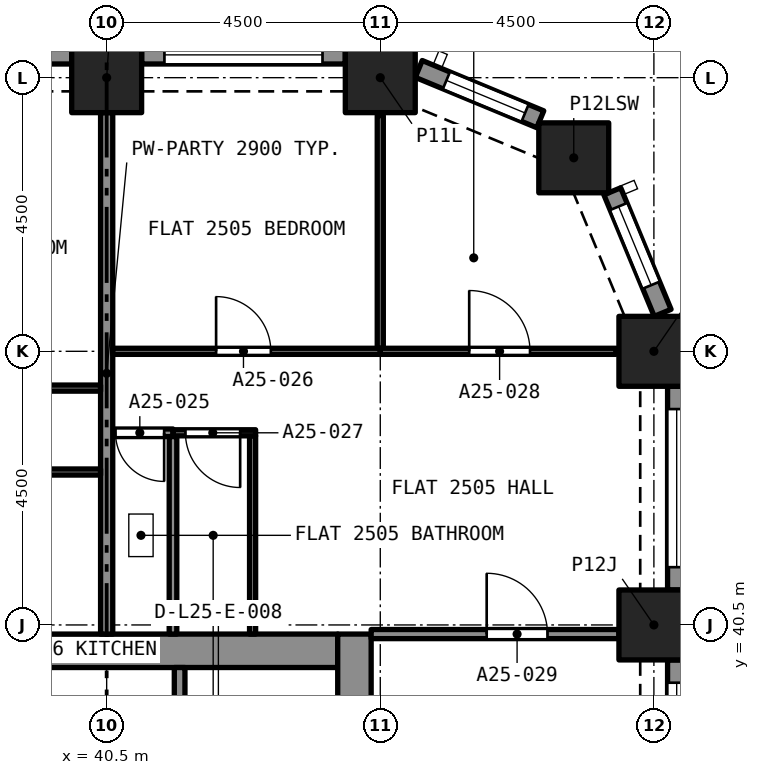
"""IFC4 building model, lengths in metres.
Left out: names, types, materials, properties, quantities, classifications, styles, units other than length and angle.
Written with IfcOpenShell. Run it as: python <this file> out.ifc"""

import sys

from ifc_helpers import new_model, si_unit, direction, frame, frame_2d, origin, origin_2d, place, context, subcontext, project, spatial, rectangle, extrude, element, fill, save


model = new_model("IFC4")
c1 = context("Model", 3, precision=1e-05, world=origin(), true_north=direction((0.0, 1.0)))
c2 = subcontext(c1, "Body", "Model", "MODEL_VIEW")
j1 = project(units=[si_unit("LENGTHUNIT", "METRE"), si_unit("PLANEANGLEUNIT", "RADIAN")], contexts=[c1])
p1 = place(None, origin())
s1 = spatial("IfcSite", under=j1, at=p1, CompositionType="ELEMENT")
p2 = place(p1, origin())
s2 = spatial("IfcBuilding", under=s1, at=p2, CompositionType="ELEMENT")
p3 = place(p2, frame((0.0, 0.0, 92.8)))
s3 = spatial("IfcBuildingStorey", under=s2, at=p3, CompositionType="ELEMENT", Elevation=92.8)
for number, where, z_axis, x_axis in (
    (1, (49.5, 40.5, 0.0), (0.0, 0.0, 1.0), (1.0, 0.0, 0.0)),
    (2, (49.5, 45.0, 0.0), (0.0, 0.0, 1.0), (1.0, 0.0, 0.0)),
    (3, (48.182, 48.182, 0.0), (0.0, 0.0, 1.0), (1.0, 0.0, 0.0)),
    (4, (40.5, 49.5, 0.0), (0.0, 0.0, 1.0), (1.0, 0.0, 0.0)),
    (5, (45.0, 49.5, 0.0), (0.0, 0.0, 1.0), (1.0, 0.0, 0.0)),
):
    element("IfcColumn", number, at=place(p3, frame(where, z_axis=z_axis, x_axis=x_axis)), inside=s3, PredefinedType="COLUMN", context=c2, shape_type="SweptSolid", body=[
        extrude(rectangle(XDim=1.15, YDim=1.15, at=origin_2d()), origin(), (0.0, 0.0, 1.0), 3.2),
    ])
p4 = place(p3, frame((36.7, 40.075, 0.0), z_axis=(0.0, 0.0, 1.0), x_axis=(1.0, 0.0, 0.0)))
e6 = element("IfcWall", 6, at=p4, inside=s3, PredefinedType="SOLIDWALL", context=c2, shape_type="SweptSolid", body=[
    extrude(rectangle(XDim=7.6, YDim=0.55, at=frame_2d((3.8, 0.0))), origin(), (0.0, 0.0, 1.0), 3.2),
])
p5 = place(p3, frame((44.575, 27.15, 0.0), z_axis=(0.0, 0.0, 1.0), x_axis=(0.0, 1.0, 0.0)))
e7 = element("IfcWall", 7, at=p5, inside=s3, PredefinedType="SOLIDWALL", context=c2, shape_type="SweptSolid", body=[
    extrude(rectangle(XDim=13.2, YDim=0.55, at=frame_2d((6.6, 0.0))), origin(), (0.0, 0.0, 1.0), 3.2),
])
p6 = place(p5, frame((8.8, 0.0, 0.0)))
e8 = element("IfcOpeningElement", 8, at=p6, cuts=e7, PredefinedType="OPENING", context=c2, shape_type="SweptSolid", body=[
    extrude(rectangle(XDim=1.2, YDim=2.1, at=frame_2d((0.6, 1.05))), frame((0.0, 0.285, 0.0), z_axis=(0.0, -1.0, 0.0), x_axis=(1.0, 0.0, 0.0)), (0.0, 0.0, 1.0), 0.57),
])
p7 = place(p3, frame((49.875, 39.925, 0.0), z_axis=(0.0, 0.0, 1.0), x_axis=(0.0, -1.0, 0.0)))
e9 = element("IfcWall", 9, at=p7, inside=s3, PredefinedType="SOLIDWALL", context=c2, shape_type="SweptSolid", body=[
    extrude(rectangle(XDim=3.35, YDim=0.3, at=frame_2d((1.675, 0.0))), origin(), (0.0, 0.0, 1.0), 3.2),
])
p8 = place(p7, frame((0.375, 0.0, 0.45)))
e10 = element("IfcOpeningElement", 10, at=p8, cuts=e9, PredefinedType="OPENING", context=c2, shape_type="SweptSolid", body=[
    extrude(rectangle(XDim=2.6, YDim=1.95, at=frame_2d((1.3, 0.975))), frame((0.0, 0.16, 0.0), z_axis=(0.0, -1.0, 0.0), x_axis=(1.0, 0.0, 0.0)), (0.0, 0.0, 1.0), 0.32),
])
p9 = place(p3, frame((49.875, 44.425, 0.0), z_axis=(0.0, 0.0, 1.0), x_axis=(0.0, -1.0, 0.0)))
e11 = element("IfcWall", 11, at=p9, inside=s3, PredefinedType="SOLIDWALL", context=c2, shape_type="SweptSolid", body=[
    extrude(rectangle(XDim=3.35, YDim=0.3, at=frame_2d((1.675, 0.0))), origin(), (0.0, 0.0, 1.0), 3.2),
])
p10 = place(p9, frame((0.375, 0.0, 0.45)))
e12 = element("IfcOpeningElement", 12, at=p10, cuts=e11, PredefinedType="OPENING", context=c2, shape_type="SweptSolid", body=[
    extrude(rectangle(XDim=2.6, YDim=1.95, at=frame_2d((1.3, 0.975))), frame((0.0, 0.16, 0.0), z_axis=(0.0, -1.0, 0.0), x_axis=(1.0, 0.0, 0.0)), (0.0, 0.0, 1.0), 0.32),
])
p11 = place(p3, frame((48.816, 47.631, 0.0), z_axis=(0.0, 0.0, 1.0), x_axis=(0.382723818695, -0.923862802911, 0.0)))
e13 = element("IfcWall", 13, at=p11, inside=s3, PredefinedType="SOLIDWALL", context=c2, shape_type="SweptSolid", body=[
    extrude(rectangle(XDim=2.164, YDim=0.3, at=frame_2d((1.082, 0.0))), origin(), (0.0, 0.0, 1.0), 3.2),
])
p12 = place(p11, frame((0.271, 0.0, 0.45)))
e14 = element("IfcOpeningElement", 14, at=p12, cuts=e13, PredefinedType="OPENING", context=c2, shape_type="SweptSolid", body=[
    extrude(rectangle(XDim=1.4, YDim=1.95, at=frame_2d((0.7, 0.975))), frame((0.0, 0.16, 0.0), z_axis=(0.0, -1.0, 0.0), x_axis=(1.0, 0.0, 0.0)), (0.0, 0.0, 1.0), 0.32),
])
p13 = place(p3, frame((45.632, 49.644, 0.0), z_axis=(0.0, 0.0, 1.0), x_axis=(0.923862802911, -0.382723818695, 0.0)))
e15 = element("IfcWall", 15, at=p13, inside=s3, PredefinedType="SOLIDWALL", context=c2, shape_type="SweptSolid", body=[
    extrude(rectangle(XDim=2.164, YDim=0.3, at=frame_2d((1.082, 0.0))), origin(), (0.0, 0.0, 1.0), 3.2),
])
p14 = place(p13, frame((0.493, 0.0, 0.45)))
e16 = element("IfcOpeningElement", 16, at=p14, cuts=e15, PredefinedType="OPENING", context=c2, shape_type="SweptSolid", body=[
    extrude(rectangle(XDim=1.4, YDim=1.95, at=frame_2d((0.7, 0.975))), frame((0.0, 0.16, 0.0), z_axis=(0.0, -1.0, 0.0), x_axis=(1.0, 0.0, 0.0)), (0.0, 0.0, 1.0), 0.32),
])
p15 = place(p3, frame((41.075, 49.875, 0.0), z_axis=(0.0, 0.0, 1.0), x_axis=(1.0, 0.0, 0.0)))
e17 = element("IfcWall", 17, at=p15, inside=s3, PredefinedType="SOLIDWALL", context=c2, shape_type="SweptSolid", body=[
    extrude(rectangle(XDim=3.35, YDim=0.3, at=frame_2d((1.675, 0.0))), origin(), (0.0, 0.0, 1.0), 3.2),
])
p16 = place(p15, frame((0.375, 0.0, 0.45)))
e18 = element("IfcOpeningElement", 18, at=p16, cuts=e17, PredefinedType="OPENING", context=c2, shape_type="SweptSolid", body=[
    extrude(rectangle(XDim=2.6, YDim=1.95, at=frame_2d((1.3, 0.975))), frame((0.0, 0.16, 0.0), z_axis=(0.0, -1.0, 0.0), x_axis=(1.0, 0.0, 0.0)), (0.0, 0.0, 1.0), 0.32),
])
p17 = place(p3, frame((36.575, 49.875, 0.0), z_axis=(0.0, 0.0, 1.0), x_axis=(1.0, 0.0, 0.0)))
e19 = element("IfcWall", 19, at=p17, inside=s3, PredefinedType="SOLIDWALL", context=c2, shape_type="SweptSolid", body=[
    extrude(rectangle(XDim=3.35, YDim=0.3, at=frame_2d((1.675, 0.0))), origin(), (0.0, 0.0, 1.0), 3.2),
])
p18 = place(p17, frame((0.375, 0.0, 0.45)))
e20 = element("IfcOpeningElement", 20, at=p18, cuts=e19, PredefinedType="OPENING", context=c2, shape_type="SweptSolid", body=[
    extrude(rectangle(XDim=2.6, YDim=1.95, at=frame_2d((1.3, 0.975))), frame((0.0, 0.16, 0.0), z_axis=(0.0, -1.0, 0.0), x_axis=(1.0, 0.0, 0.0)), (0.0, 0.0, 1.0), 0.32),
])
p19 = place(p3, frame((41.591, 43.66, 0.0), z_axis=(0.0, 0.0, 1.0), x_axis=(-1.0, 0.0, 0.0)))
e21 = element("IfcWall", 21, at=p19, inside=s3, PredefinedType="PARTITIONING", context=c2, shape_type="SweptSolid", body=[
    extrude(rectangle(XDim=0.991, YDim=0.125, at=frame_2d((0.495, 0.0))), origin(), (0.0, 0.0, 1.0), 2.9),
])
p20 = place(p19, frame((0.146, 0.0, 0.0)))
e22 = element("IfcOpeningElement", 22, at=p20, cuts=e21, PredefinedType="OPENING", context=c2, shape_type="SweptSolid", body=[
    extrude(rectangle(XDim=0.8, YDim=2.1, at=frame_2d((0.4, 1.05))), frame((0.0, 0.073, 0.0), z_axis=(0.0, -1.0, 0.0), x_axis=(1.0, 0.0, 0.0)), (0.0, 0.0, 1.0), 0.145),
])
p21 = place(p3, frame((41.591, 40.35, 0.0), z_axis=(0.0, 0.0, 1.0), x_axis=(0.0, 1.0, 0.0)))
e23 = element("IfcWall", 23, at=p21, inside=s3, PredefinedType="PARTITIONING", context=c2, shape_type="SweptSolid", body=[
    extrude(rectangle(XDim=3.247, YDim=0.125, at=frame_2d((1.624, 0.0))), origin(), (0.0, 0.0, 1.0), 2.9),
])
p22 = place(p3, frame((40.5, 40.35, 0.0), z_axis=(0.0, 0.0, 1.0), x_axis=(0.0, 1.0, 0.0)))
e24 = element("IfcWall", 24, at=p22, inside=s3, PredefinedType="PARTITIONING", context=c2, shape_type="SweptSolid", body=[
    extrude(rectangle(XDim=8.575, YDim=0.2, at=frame_2d((4.288, 0.0))), origin(), (0.0, 0.0, 1.0), 2.9),
])
p23 = place(p3, frame((40.6, 45.0, 0.0), z_axis=(0.0, 0.0, 1.0), x_axis=(1.0, 0.0, 0.0)))
e25 = element("IfcWall", 25, at=p23, inside=s3, PredefinedType="PARTITIONING", context=c2, shape_type="SweptSolid", body=[
    extrude(rectangle(XDim=4.4, YDim=0.1, at=frame_2d((2.2, 0.0))), origin(), (0.0, 0.0, 1.0), 2.9),
])
p24 = place(p23, frame((1.7, 0.0, 0.0)))
e26 = element("IfcOpeningElement", 26, at=p24, cuts=e25, PredefinedType="OPENING", context=c2, shape_type="SweptSolid", body=[
    extrude(rectangle(XDim=0.9, YDim=2.1, at=frame_2d((0.45, 1.05))), frame((0.0, 0.06, 0.0), z_axis=(0.0, -1.0, 0.0), x_axis=(1.0, 0.0, 0.0)), (0.0, 0.0, 1.0), 0.12),
])
p25 = place(p3, frame((45.0, 45.05, 0.0), z_axis=(0.0, 0.0, 1.0), x_axis=(0.0, 1.0, 0.0)))
e27 = element("IfcWall", 27, at=p25, inside=s3, PredefinedType="PARTITIONING", context=c2, shape_type="SweptSolid", body=[
    extrude(rectangle(XDim=3.828, YDim=0.1, at=frame_2d((1.914, 0.0))), origin(), (0.0, 0.0, 1.0), 2.9),
])
p26 = place(p3, frame((42.9, 40.35, 0.0), z_axis=(0.0, 0.0, 1.0), x_axis=(0.0, 1.0, 0.0)))
e28 = element("IfcWall", 28, at=p26, inside=s3, PredefinedType="PARTITIONING", context=c2, shape_type="SweptSolid", body=[
    extrude(rectangle(XDim=3.26, YDim=0.1, at=frame_2d((1.63, 0.0))), origin(), (0.0, 0.0, 1.0), 2.9),
])
p27 = place(p3, frame((42.95, 43.66, 0.0), z_axis=(0.0, 0.0, 1.0), x_axis=(-1.0, 0.0, 0.0)))
e29 = element("IfcWall", 29, at=p27, inside=s3, PredefinedType="PARTITIONING", context=c2, shape_type="SweptSolid", body=[
    extrude(rectangle(XDim=1.359, YDim=0.1, at=frame_2d((0.68, 0.0))), origin(), (0.0, 0.0, 1.0), 2.9),
])
p28 = place(p27, frame((0.254, 0.0, 0.0)))
e30 = element("IfcOpeningElement", 30, at=p28, cuts=e29, PredefinedType="OPENING", context=c2, shape_type="SweptSolid", body=[
    extrude(rectangle(XDim=0.9, YDim=2.1, at=frame_2d((0.45, 1.05))), frame((0.0, 0.06, 0.0), z_axis=(0.0, -1.0, 0.0), x_axis=(1.0, 0.0, 0.0)), (0.0, 0.0, 1.0), 0.12),
])
p29 = place(p3, frame((45.0, 45.0, 0.0), z_axis=(0.0, 0.0, 1.0), x_axis=(1.0, 0.0, 0.0)))
e31 = element("IfcWall", 31, at=p29, inside=s3, PredefinedType="PARTITIONING", context=c2, shape_type="SweptSolid", body=[
    extrude(rectangle(XDim=3.878, YDim=0.1, at=frame_2d((1.939, 0.0))), origin(), (0.0, 0.0, 1.0), 2.9),
])
p30 = place(p29, frame((1.462, 0.0, 0.0)))
e32 = element("IfcOpeningElement", 32, at=p30, cuts=e31, PredefinedType="OPENING", context=c2, shape_type="SweptSolid", body=[
    extrude(rectangle(XDim=1.0, YDim=2.1, at=frame_2d((0.5, 1.05))), frame((0.0, 0.06, 0.0), z_axis=(0.0, -1.0, 0.0), x_axis=(1.0, 0.0, 0.0)), (0.0, 0.0, 1.0), 0.12),
])
p31 = place(p3, frame((44.85, 40.35, 0.0), z_axis=(0.0, 0.0, 1.0), x_axis=(1.0, 0.0, 0.0)))
e33 = element("IfcWall", 33, at=p31, inside=s3, PredefinedType="PARTITIONING", context=c2, shape_type="SweptSolid", body=[
    extrude(rectangle(XDim=4.075, YDim=0.15, at=frame_2d((2.038, 0.0))), origin(), (0.0, 0.0, 1.0), 2.9),
])
p32 = place(p31, frame((1.9, 0.0, 0.0)))
e34 = element("IfcOpeningElement", 34, at=p32, cuts=e33, PredefinedType="OPENING", context=c2, shape_type="SweptSolid", body=[
    extrude(rectangle(XDim=1.0, YDim=2.1, at=frame_2d((0.5, 1.05))), frame((0.0, 0.085, 0.0), z_axis=(0.0, -1.0, 0.0), x_axis=(1.0, 0.0, 0.0)), (0.0, 0.0, 1.0), 0.17),
])
p33 = place(p3, frame((36.0, 44.395, 0.0), z_axis=(0.0, 0.0, 1.0), x_axis=(1.0, 0.0, 0.0)))
e35 = element("IfcWall", 35, at=p33, inside=s3, PredefinedType="PARTITIONING", context=c2, shape_type="SweptSolid", body=[
    extrude(rectangle(XDim=4.4, YDim=0.1, at=frame_2d((2.2, 0.0))), origin(), (0.0, 0.0, 1.0), 2.9),
])
p34 = place(p33, frame((1.8, 0.0, 0.0)))
e36 = element("IfcOpeningElement", 36, at=p34, cuts=e35, PredefinedType="OPENING", context=c2, shape_type="SweptSolid", body=[
    extrude(rectangle(XDim=0.9, YDim=2.1, at=frame_2d((0.45, 1.05))), frame((0.0, 0.06, 0.0), z_axis=(0.0, -1.0, 0.0), x_axis=(1.0, 0.0, 0.0)), (0.0, 0.0, 1.0), 0.12),
])
p35 = place(p3, frame((40.4, 43.015, 0.0), z_axis=(0.0, 0.0, 1.0), x_axis=(-1.0, 0.0, 0.0)))
e37 = element("IfcWall", 37, at=p35, inside=s3, PredefinedType="PARTITIONING", context=c2, shape_type="SweptSolid", body=[
    extrude(rectangle(XDim=3.209, YDim=0.1, at=frame_2d((1.605, 0.0))), origin(), (0.0, 0.0, 1.0), 2.9),
])
p36 = place(p35, frame((1.105, 0.0, 0.0)))
e38 = element("IfcOpeningElement", 38, at=p36, cuts=e37, PredefinedType="OPENING", context=c2, shape_type="SweptSolid", body=[
    extrude(rectangle(XDim=0.9, YDim=2.1, at=frame_2d((0.45, 1.05))), frame((0.0, 0.06, 0.0), z_axis=(0.0, -1.0, 0.0), x_axis=(1.0, 0.0, 0.0)), (0.0, 0.0, 1.0), 0.12),
])
p37 = place(p3, frame((41.7, 37.5, 0.0), z_axis=(0.0, 0.0, 1.0), x_axis=(0.0, 1.0, 0.0)))
e39 = element("IfcWall", 39, at=p37, inside=s3, PredefinedType="SOLIDWALL", context=c2, shape_type="SweptSolid", body=[
    extrude(rectangle(XDim=2.3, YDim=0.175, at=frame_2d((1.15, 0.0))), origin(), (0.0, 0.0, 1.0), 2.9),
])
p38 = place(p8, origin())
e40 = element("IfcWindow", 40, at=p38, inside=s3, PartitioningType="SINGLE_PANEL", PredefinedType="WINDOW", context=c2, shape_type="SweptSolid", body=[
    extrude(rectangle(XDim=2.6, YDim=1.95, at=frame_2d((1.3, 0.975))), frame((0.0, 0.03, 0.0), z_axis=(0.0, -1.0, 0.0), x_axis=(1.0, 0.0, 0.0)), (0.0, 0.0, 1.0), 0.06),
])
fill(e10, e40)
p39 = place(p10, origin())
e41 = element("IfcWindow", 41, at=p39, inside=s3, PartitioningType="SINGLE_PANEL", PredefinedType="WINDOW", context=c2, shape_type="SweptSolid", body=[
    extrude(rectangle(XDim=2.6, YDim=1.95, at=frame_2d((1.3, 0.975))), frame((0.0, 0.03, 0.0), z_axis=(0.0, -1.0, 0.0), x_axis=(1.0, 0.0, 0.0)), (0.0, 0.0, 1.0), 0.06),
])
fill(e12, e41)
p40 = place(p12, origin())
e42 = element("IfcWindow", 42, at=p40, inside=s3, PartitioningType="SINGLE_PANEL", PredefinedType="WINDOW", context=c2, shape_type="SweptSolid", body=[
    extrude(rectangle(XDim=1.4, YDim=1.95, at=frame_2d((0.7, 0.975))), frame((0.0, 0.03, 0.0), z_axis=(0.0, -1.0, 0.0), x_axis=(1.0, 0.0, 0.0)), (0.0, 0.0, 1.0), 0.06),
])
fill(e14, e42)
p41 = place(p14, origin())
e43 = element("IfcWindow", 43, at=p41, inside=s3, PartitioningType="SINGLE_PANEL", PredefinedType="WINDOW", context=c2, shape_type="SweptSolid", body=[
    extrude(rectangle(XDim=1.4, YDim=1.95, at=frame_2d((0.7, 0.975))), frame((0.0, 0.03, 0.0), z_axis=(0.0, -1.0, 0.0), x_axis=(1.0, 0.0, 0.0)), (0.0, 0.0, 1.0), 0.06),
])
fill(e16, e43)
p42 = place(p16, origin())
e44 = element("IfcWindow", 44, at=p42, inside=s3, PartitioningType="SINGLE_PANEL", PredefinedType="WINDOW", context=c2, shape_type="SweptSolid", body=[
    extrude(rectangle(XDim=2.6, YDim=1.95, at=frame_2d((1.3, 0.975))), frame((0.0, 0.03, 0.0), z_axis=(0.0, -1.0, 0.0), x_axis=(1.0, 0.0, 0.0)), (0.0, 0.0, 1.0), 0.06),
])
fill(e18, e44)
p43 = place(p20, origin())
e45 = element("IfcDoor", 45, at=p43, inside=s3, OperationType="SINGLE_SWING_RIGHT", PredefinedType="DOOR", context=c2, shape_type="SweptSolid", body=[
    extrude(rectangle(XDim=0.8, YDim=2.1, at=frame_2d((0.4, 1.05))), frame((0.0, 0.025, 0.0), z_axis=(0.0, -1.0, 0.0), x_axis=(1.0, 0.0, 0.0)), (0.0, 0.0, 1.0), 0.05),
])
fill(e22, e45)
p44 = place(p24, origin())
e46 = element("IfcDoor", 46, at=p44, inside=s3, OperationType="SINGLE_SWING_LEFT", PredefinedType="DOOR", context=c2, shape_type="SweptSolid", body=[
    extrude(rectangle(XDim=0.9, YDim=2.1, at=frame_2d((0.45, 1.05))), frame((0.0, 0.025, 0.0), z_axis=(0.0, -1.0, 0.0), x_axis=(1.0, 0.0, 0.0)), (0.0, 0.0, 1.0), 0.05),
])
fill(e26, e46)
p45 = place(p28, origin())
e47 = element("IfcDoor", 47, at=p45, inside=s3, OperationType="SINGLE_SWING_RIGHT", PredefinedType="DOOR", context=c2, shape_type="SweptSolid", body=[
    extrude(rectangle(XDim=0.9, YDim=2.1, at=frame_2d((0.45, 1.05))), frame((0.0, 0.025, 0.0), z_axis=(0.0, -1.0, 0.0), x_axis=(1.0, 0.0, 0.0)), (0.0, 0.0, 1.0), 0.05),
])
fill(e30, e47)
p46 = place(p30, origin())
e48 = element("IfcDoor", 48, at=p46, inside=s3, OperationType="SINGLE_SWING_RIGHT", PredefinedType="DOOR", context=c2, shape_type="SweptSolid", body=[
    extrude(rectangle(XDim=1.0, YDim=2.1, at=frame_2d((0.5, 1.05))), frame((0.0, 0.025, 0.0), z_axis=(0.0, -1.0, 0.0), x_axis=(1.0, 0.0, 0.0)), (0.0, 0.0, 1.0), 0.05),
])
fill(e32, e48)
p47 = place(p32, origin())
e49 = element("IfcDoor", 49, at=p47, inside=s3, OperationType="SINGLE_SWING_RIGHT", PredefinedType="DOOR", context=c2, shape_type="SweptSolid", body=[
    extrude(rectangle(XDim=1.0, YDim=2.1, at=frame_2d((0.5, 1.05))), frame((0.0, 0.025, 0.0), z_axis=(0.0, -1.0, 0.0), x_axis=(1.0, 0.0, 0.0)), (0.0, 0.0, 1.0), 0.05),
])
fill(e34, e49)
save(model, sys.argv[1])
